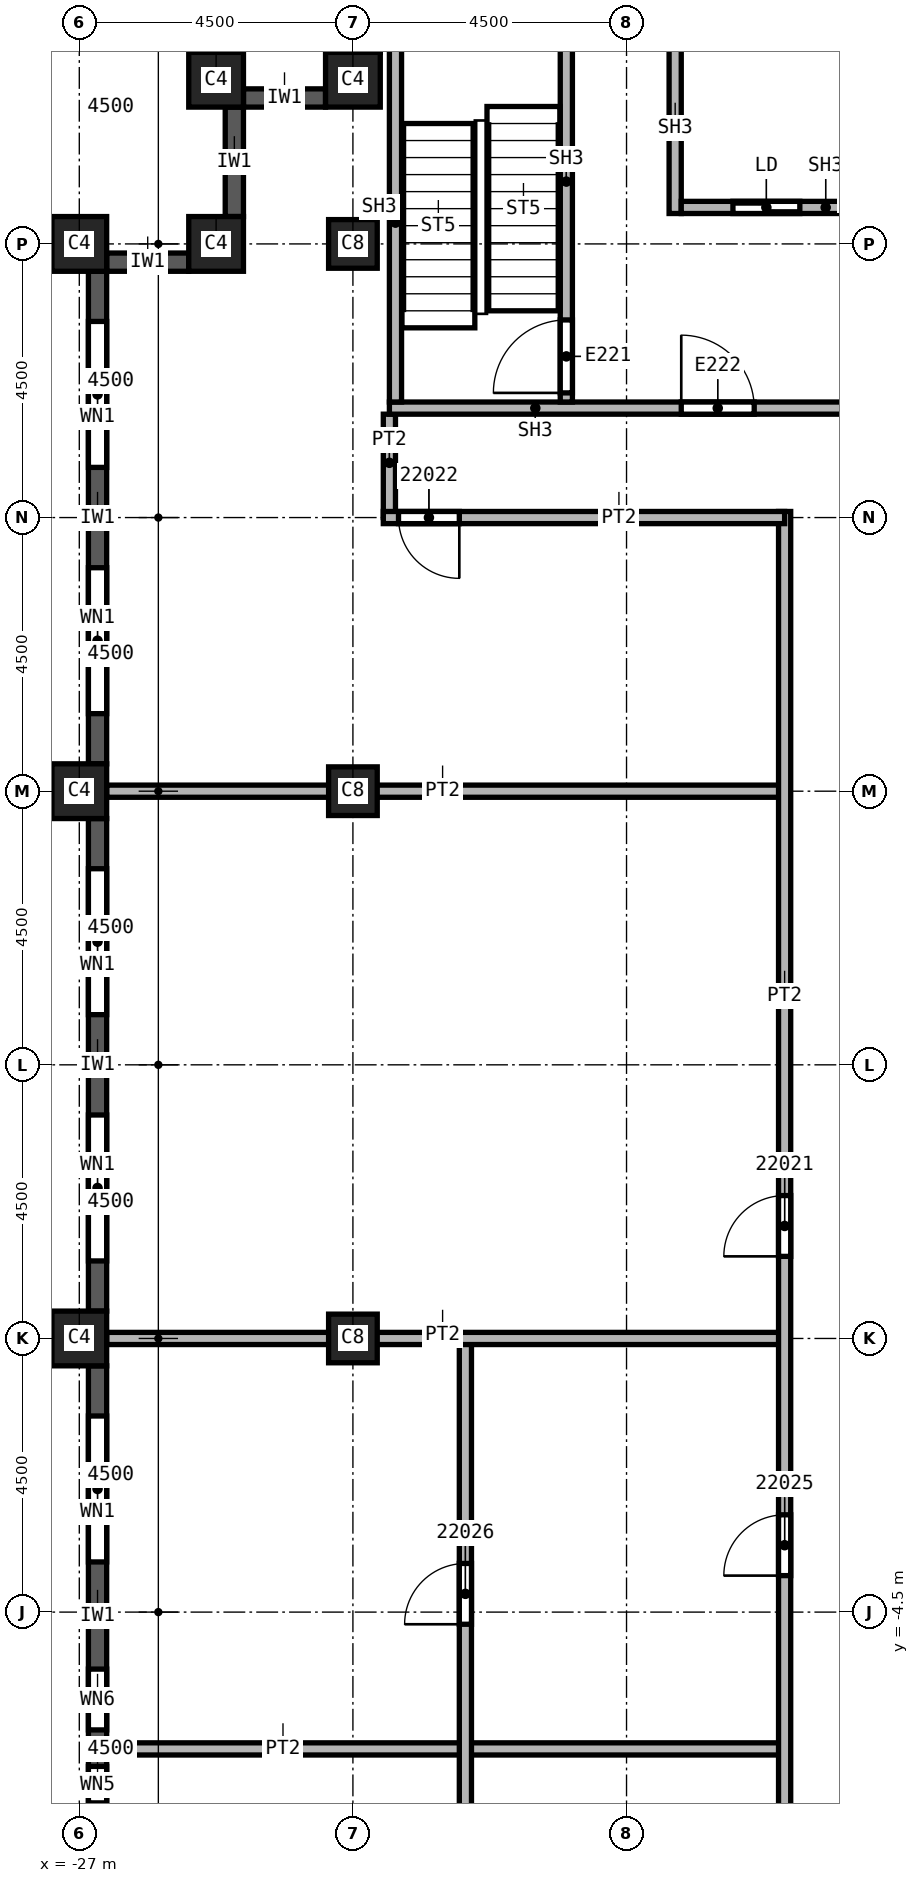
"""IFC4 building model, lengths in metres.
Left out: names, types, materials, properties, quantities, classifications, styles, units other than length and angle.
Written with IfcOpenShell. Run it as: python <this file> out.ifc"""

import sys

from ifc_helpers import new_model, si_unit, direction, frame, frame_2d, origin, origin_2d, place, context, subcontext, project, spatial, rectangle, extrude, element, fill, save


model = new_model("IFC4")
c1 = context("Model", 3, precision=1e-05, world=origin(), true_north=direction((0.0, 1.0)))
c2 = subcontext(c1, "Body", "Model", "MODEL_VIEW")
j1 = project(units=[si_unit("LENGTHUNIT", "METRE"), si_unit("PLANEANGLEUNIT", "RADIAN")], contexts=[c1])
p1 = place(None, origin())
s1 = spatial("IfcSite", under=j1, at=p1, CompositionType="ELEMENT")
p2 = place(p1, origin())
s2 = spatial("IfcBuilding", under=s1, at=p2, CompositionType="ELEMENT")
p3 = place(p2, frame((0.0, 0.0, 312.0)))
s3 = spatial("IfcBuildingStorey", under=s2, at=p3, CompositionType="ELEMENT", Elevation=312.0)
for number, where, z_axis, x_axis in (
    (1, (-22.5, 0.0, 0.0), (0.0, 0.0, 1.0), (1.0, 0.0, 0.0)),
    (2, (-22.5, 9.0, 0.0), (0.0, 0.0, 1.0), (1.0, 0.0, 0.0)),
    (3, (-22.5, 18.0, 0.0), (0.0, 0.0, 1.0), (1.0, 0.0, 0.0)),
):
    element("IfcColumn", number, at=place(p3, frame(where, z_axis=z_axis, x_axis=x_axis)), inside=s3, PredefinedType="COLUMN", context=c2, shape_type="SweptSolid", body=[
        extrude(rectangle(XDim=0.8, YDim=0.8, at=origin_2d()), origin(), (0.0, 0.0, 1.0), 3.74),
    ])
for number, where, z_axis, x_axis in (
    (4, (-27.0, 0.0, 0.0), (0.0, 0.0, 1.0), (0.0, 1.0, 0.0)),
    (5, (-27.0, 9.0, 0.0), (0.0, 0.0, 1.0), (0.0, 1.0, 0.0)),
    (6, (-27.0, 18.0, 0.0), (0.0, 0.0, 1.0), (0.0, 1.0, 0.0)),
    (7, (-22.5, 20.7, 0.0), (0.0, 0.0, 1.0), (1.0, 0.0, 0.0)),
    (8, (-24.75, 20.7, 0.0), (0.0, 0.0, 1.0), (1.0, 0.0, 0.0)),
    (9, (-24.75, 18.0, 0.0), (0.0, 0.0, 1.0), (1.0, 0.0, 0.0)),
):
    element("IfcColumn", number, at=place(p3, frame(where, z_axis=z_axis, x_axis=x_axis)), inside=s3, PredefinedType="COLUMN", context=c2, shape_type="SweptSolid", body=[
        extrude(rectangle(XDim=0.9, YDim=0.9, at=origin_2d()), origin(), (0.0, 0.0, 1.0), 3.74),
    ])
p4 = place(p3, frame((-24.45, 20.25, 0.0), z_axis=(0.0, 0.0, 1.0), x_axis=(0.0, -1.0, 0.0)))
e10 = element("IfcWall", 10, at=p4, inside=s3, PredefinedType="SOLIDWALL", context=c2, shape_type="SweptSolid", body=[
    extrude(rectangle(XDim=1.8, YDim=0.3, at=frame_2d((0.9, 0.0))), origin(), (0.0, 0.0, 1.0), 3.14),
])
p5 = place(p3, frame((-25.2, 17.7, 0.0), z_axis=(0.0, 0.0, 1.0), x_axis=(-1.0, 0.0, 0.0)))
e11 = element("IfcWall", 11, at=p5, inside=s3, PredefinedType="SOLIDWALL", context=c2, shape_type="SweptSolid", body=[
    extrude(rectangle(XDim=1.35, YDim=0.3, at=frame_2d((0.675, 0.0))), origin(), (0.0, 0.0, 1.0), 3.14),
])
p6 = place(p3, frame((-26.7, 17.55, 0.0), z_axis=(0.0, 0.0, 1.0), x_axis=(0.0, -1.0, 0.0)))
e12 = element("IfcWall", 12, at=p6, inside=s3, PredefinedType="SOLIDWALL", context=c2, shape_type="SweptSolid", body=[
    extrude(rectangle(XDim=8.1, YDim=0.3, at=frame_2d((4.05, 0.0))), origin(), (0.0, 0.0, 1.0), 3.14),
])
p7 = place(p6, frame((0.825, 0.0, 0.8)))
e13 = element("IfcOpeningElement", 13, at=p7, cuts=e12, PredefinedType="OPENING", context=c2, shape_type="SweptSolid", body=[
    extrude(rectangle(XDim=2.4, YDim=1.95, at=frame_2d((1.2, 0.975))), frame((0.0, 0.15, 0.0), z_axis=(0.0, -1.0, 0.0), x_axis=(1.0, 0.0, 0.0)), (0.0, 0.0, 1.0), 0.3),
])
p8 = place(p6, frame((4.875, 0.0, 0.8)))
e14 = element("IfcOpeningElement", 14, at=p8, cuts=e12, PredefinedType="OPENING", context=c2, shape_type="SweptSolid", body=[
    extrude(rectangle(XDim=2.4, YDim=1.95, at=frame_2d((1.2, 0.975))), frame((0.0, 0.15, 0.0), z_axis=(0.0, -1.0, 0.0), x_axis=(1.0, 0.0, 0.0)), (0.0, 0.0, 1.0), 0.3),
])
p9 = place(p3, frame((-26.7, 8.55, 0.0), z_axis=(0.0, 0.0, 1.0), x_axis=(0.0, -1.0, 0.0)))
e15 = element("IfcWall", 15, at=p9, inside=s3, PredefinedType="SOLIDWALL", context=c2, shape_type="SweptSolid", body=[
    extrude(rectangle(XDim=8.1, YDim=0.3, at=frame_2d((4.05, 0.0))), origin(), (0.0, 0.0, 1.0), 3.14),
])
p10 = place(p9, frame((0.825, 0.0, 0.8)))
e16 = element("IfcOpeningElement", 16, at=p10, cuts=e15, PredefinedType="OPENING", context=c2, shape_type="SweptSolid", body=[
    extrude(rectangle(XDim=2.4, YDim=1.95, at=frame_2d((1.2, 0.975))), frame((0.0, 0.15, 0.0), z_axis=(0.0, -1.0, 0.0), x_axis=(1.0, 0.0, 0.0)), (0.0, 0.0, 1.0), 0.3),
])
p11 = place(p9, frame((4.875, 0.0, 0.8)))
e17 = element("IfcOpeningElement", 17, at=p11, cuts=e15, PredefinedType="OPENING", context=c2, shape_type="SweptSolid", body=[
    extrude(rectangle(XDim=2.4, YDim=1.95, at=frame_2d((1.2, 0.975))), frame((0.0, 0.15, 0.0), z_axis=(0.0, -1.0, 0.0), x_axis=(1.0, 0.0, 0.0)), (0.0, 0.0, 1.0), 0.3),
])
p12 = place(p3, frame((-26.7, -0.45, 0.0), z_axis=(0.0, 0.0, 1.0), x_axis=(0.0, -1.0, 0.0)))
e18 = element("IfcWall", 18, at=p12, inside=s3, PredefinedType="SOLIDWALL", context=c2, shape_type="SweptSolid", body=[
    extrude(rectangle(XDim=8.1, YDim=0.3, at=frame_2d((4.05, 0.0))), origin(), (0.0, 0.0, 1.0), 3.14),
])
p13 = place(p12, frame((0.825, 0.0, 0.8)))
e19 = element("IfcOpeningElement", 19, at=p13, cuts=e18, PredefinedType="OPENING", context=c2, shape_type="SweptSolid", body=[
    extrude(rectangle(XDim=2.4, YDim=1.95, at=frame_2d((1.2, 0.975))), frame((0.0, 0.15, 0.0), z_axis=(0.0, -1.0, 0.0), x_axis=(1.0, 0.0, 0.0)), (0.0, 0.0, 1.0), 0.3),
])
p14 = place(p12, frame((4.988, 0.0, 0.8)))
e20 = element("IfcOpeningElement", 20, at=p14, cuts=e18, PredefinedType="OPENING", context=c2, shape_type="SweptSolid", body=[
    extrude(rectangle(XDim=1.0, YDim=1.95, at=frame_2d((0.5, 0.975))), frame((0.0, 0.15, 0.0), z_axis=(0.0, -1.0, 0.0), x_axis=(1.0, 0.0, 0.0)), (0.0, 0.0, 1.0), 0.3),
])
p15 = place(p12, frame((6.587, 0.0, 0.8)))
e21 = element("IfcOpeningElement", 21, at=p15, cuts=e18, PredefinedType="OPENING", context=c2, shape_type="SweptSolid", body=[
    extrude(rectangle(XDim=0.6, YDim=1.95, at=frame_2d((0.3, 0.975))), frame((0.0, 0.15, 0.0), z_axis=(0.0, -1.0, 0.0), x_axis=(1.0, 0.0, 0.0)), (0.0, 0.0, 1.0), 0.3),
])
p16 = place(p3, frame((-22.95, 20.4, 0.0), z_axis=(0.0, 0.0, 1.0), x_axis=(-1.0, 0.0, 0.0)))
e22 = element("IfcWall", 22, at=p16, inside=s3, PredefinedType="SOLIDWALL", context=c2, shape_type="SweptSolid", body=[
    extrude(rectangle(XDim=1.35, YDim=0.3, at=frame_2d((0.675, 0.0))), origin(), (0.0, 0.0, 1.0), 3.14),
])
for number, where, z_axis, x_axis in (
    (23, (-26.55, -6.75, 0.0), (0.0, 0.0, 1.0), (1.0, 0.0, 0.0)),
    (24, (-26.55, 9.0, 0.0), (0.0, 0.0, 1.0), (1.0, 0.0, 0.0)),
):
    element("IfcWall", number, at=place(p3, frame(where, z_axis=z_axis, x_axis=x_axis)), inside=s3, PredefinedType="PARTITIONING", context=c2, shape_type="SweptSolid", body=[
        extrude(rectangle(XDim=11.15, YDim=0.2, at=frame_2d((5.575, 0.0))), origin(), (0.0, 0.0, 1.0), 3.74),
    ])
p17 = place(p3, frame((-21.9, 13.5, 0.0), z_axis=(0.0, 0.0, 1.0), x_axis=(0.0, 1.0, 0.0)))
e25 = element("IfcWall", 25, at=p17, inside=s3, PredefinedType="PARTITIONING", context=c2, shape_type="SweptSolid", body=[
    extrude(rectangle(XDim=1.7, YDim=0.2, at=frame_2d((0.85, 0.0))), origin(), (0.0, 0.0, 1.0), 3.74),
])
p18 = place(p3, frame((-20.65, -22.95, 0.0), z_axis=(0.0, 0.0, 1.0), x_axis=(0.0, 1.0, 0.0)))
e26 = element("IfcWall", 26, at=p18, inside=s3, PredefinedType="PARTITIONING", context=c2, shape_type="SweptSolid", body=[
    extrude(rectangle(XDim=22.95, YDim=0.2, at=frame_2d((11.475, 0.0))), origin(), (0.0, 0.0, 1.0), 3.74),
])
p19 = place(p18, frame((8.5, 0.0, 0.0)))
e27 = element("IfcOpeningElement", 27, at=p19, cuts=e26, PredefinedType="OPENING", context=c2, shape_type="SweptSolid", body=[
    extrude(rectangle(XDim=1.0, YDim=2.1, at=frame_2d((0.5, 1.05))), frame((0.0, 0.1, 0.0), z_axis=(0.0, -1.0, 0.0), x_axis=(1.0, 0.0, 0.0)), (0.0, 0.0, 1.0), 0.2),
])
p20 = place(p18, frame((18.25, 0.0, 0.0)))
e28 = element("IfcOpeningElement", 28, at=p20, cuts=e26, PredefinedType="OPENING", context=c2, shape_type="SweptSolid", body=[
    extrude(rectangle(XDim=1.0, YDim=2.1, at=frame_2d((0.5, 1.05))), frame((0.0, 0.1, 0.0), z_axis=(0.0, -1.0, 0.0), x_axis=(1.0, 0.0, 0.0)), (0.0, 0.0, 1.0), 0.2),
])
p21 = place(p3, frame((-15.4, 0.0, 0.0), z_axis=(0.0, 0.0, 1.0), x_axis=(-1.0, 0.0, 0.0)))
e29 = element("IfcWall", 29, at=p21, inside=s3, PredefinedType="PARTITIONING", context=c2, shape_type="SweptSolid", body=[
    extrude(rectangle(XDim=11.15, YDim=0.2, at=frame_2d((5.575, 0.0))), origin(), (0.0, 0.0, 1.0), 3.74),
])
p22 = place(p3, frame((-15.4, -22.95, 0.0), z_axis=(0.0, 0.0, 1.0), x_axis=(0.0, 1.0, 0.0)))
e30 = element("IfcWall", 30, at=p22, inside=s3, PredefinedType="PARTITIONING", context=c2, shape_type="SweptSolid", body=[
    extrude(rectangle(XDim=36.55, YDim=0.2, at=frame_2d((18.275, 0.0))), origin(), (0.0, 0.0, 1.0), 3.74),
])
p23 = place(p22, frame((24.3, 0.0, 0.0)))
e31 = element("IfcOpeningElement", 31, at=p23, cuts=e30, PredefinedType="OPENING", context=c2, shape_type="SweptSolid", body=[
    extrude(rectangle(XDim=1.0, YDim=2.1, at=frame_2d((0.5, 1.05))), frame((0.0, 0.1, 0.0), z_axis=(0.0, -1.0, 0.0), x_axis=(1.0, 0.0, 0.0)), (0.0, 0.0, 1.0), 0.2),
])
p24 = place(p22, frame((9.4, 0.0, 0.0)))
e32 = element("IfcOpeningElement", 32, at=p24, cuts=e30, PredefinedType="OPENING", context=c2, shape_type="SweptSolid", body=[
    extrude(rectangle(XDim=1.0, YDim=2.1, at=frame_2d((0.5, 1.05))), frame((0.0, 0.1, 0.0), z_axis=(0.0, -1.0, 0.0), x_axis=(1.0, 0.0, 0.0)), (0.0, 0.0, 1.0), 0.2),
])
p25 = place(p22, frame((19.05, 0.0, 0.0)))
e33 = element("IfcOpeningElement", 33, at=p25, cuts=e30, PredefinedType="OPENING", context=c2, shape_type="SweptSolid", body=[
    extrude(rectangle(XDim=1.0, YDim=2.1, at=frame_2d((0.5, 1.05))), frame((0.0, 0.1, 0.0), z_axis=(0.0, -1.0, 0.0), x_axis=(1.0, 0.0, 0.0)), (0.0, 0.0, 1.0), 0.2),
])
p26 = place(p3, frame((-15.4, 13.5, 0.0), z_axis=(0.0, 0.0, 1.0), x_axis=(-1.0, 0.0, 0.0)))
e34 = element("IfcWall", 34, at=p26, inside=s3, PredefinedType="PARTITIONING", context=c2, shape_type="SweptSolid", body=[
    extrude(rectangle(XDim=6.6, YDim=0.2, at=frame_2d((3.3, 0.0))), origin(), (0.0, 0.0, 1.0), 3.74),
])
p27 = place(p26, frame((5.35, 0.0, 0.0)))
e35 = element("IfcOpeningElement", 35, at=p27, cuts=e34, PredefinedType="OPENING", context=c2, shape_type="SweptSolid", body=[
    extrude(rectangle(XDim=1.0, YDim=2.1, at=frame_2d((0.5, 1.05))), frame((0.0, 0.1, 0.0), z_axis=(0.0, -1.0, 0.0), x_axis=(1.0, 0.0, 0.0)), (0.0, 0.0, 1.0), 0.2),
])
p28 = place(p3, frame((-21.9, 15.3, 0.0), z_axis=(0.0, 0.0, 1.0), x_axis=(1.0, 0.0, 0.0)))
e36 = element("IfcWall", 36, at=p28, inside=s3, PredefinedType="SOLIDWALL", context=c2, shape_type="SweptSolid", body=[
    extrude(rectangle(XDim=8.275, YDim=0.2, at=frame_2d((4.137, 0.0))), origin(), (0.0, 0.0, 1.0), 3.74),
])
p29 = place(p28, frame((4.8, 0.0, 0.0)))
e37 = element("IfcOpeningElement", 37, at=p29, cuts=e36, PredefinedType="OPENING", context=c2, shape_type="SweptSolid", body=[
    extrude(rectangle(XDim=1.2, YDim=2.1, at=frame_2d((0.6, 1.05))), frame((0.0, 0.1, 0.0), z_axis=(0.0, -1.0, 0.0), x_axis=(1.0, 0.0, 0.0)), (0.0, 0.0, 1.0), 0.2),
])
p30 = place(p3, frame((-21.8, 15.4, 0.0), z_axis=(0.0, 0.0, 1.0), x_axis=(0.0, 1.0, 0.0)))
e38 = element("IfcWall", 38, at=p30, inside=s3, PredefinedType="SOLIDWALL", context=c2, shape_type="SweptSolid", body=[
    extrude(rectangle(XDim=5.9, YDim=0.2, at=frame_2d((2.95, 0.0))), origin(), (0.0, 0.0, 1.0), 3.74),
])
p31 = place(p3, frame((-18.99, 15.4, 0.0), z_axis=(0.0, 0.0, 1.0), x_axis=(0.0, 1.0, 0.0)))
e39 = element("IfcWall", 39, at=p31, inside=s3, PredefinedType="SOLIDWALL", context=c2, shape_type="SweptSolid", body=[
    extrude(rectangle(XDim=5.9, YDim=0.2, at=frame_2d((2.95, 0.0))), origin(), (0.0, 0.0, 1.0), 3.74),
])
p32 = place(p31, frame((0.15, 0.0, 0.0)))
e40 = element("IfcOpeningElement", 40, at=p32, cuts=e39, PredefinedType="OPENING", context=c2, shape_type="SweptSolid", body=[
    extrude(rectangle(XDim=1.2, YDim=2.1, at=frame_2d((0.6, 1.05))), frame((0.0, 0.1, 0.0), z_axis=(0.0, -1.0, 0.0), x_axis=(1.0, 0.0, 0.0)), (0.0, 0.0, 1.0), 0.2),
])
p33 = place(p3, frame((-17.2, 18.5, 0.0), z_axis=(0.0, 0.0, 1.0), x_axis=(0.0, 1.0, 0.0)))
e41 = element("IfcWall", 41, at=p33, inside=s3, PredefinedType="SOLIDWALL", context=c2, shape_type="SweptSolid", body=[
    extrude(rectangle(XDim=2.8, YDim=0.2, at=frame_2d((1.4, 0.0))), origin(), (0.0, 0.0, 1.0), 3.74),
])
p34 = place(p3, frame((-17.1, 18.6, 0.0), z_axis=(0.0, 0.0, 1.0), x_axis=(1.0, 0.0, 0.0)))
e42 = element("IfcWall", 42, at=p34, inside=s3, PredefinedType="SOLIDWALL", context=c2, shape_type="SweptSolid", body=[
    extrude(rectangle(XDim=2.8, YDim=0.2, at=frame_2d((1.4, 0.0))), origin(), (0.0, 0.0, 1.0), 3.74),
])
p35 = place(p34, frame((0.85, 0.0, 0.0)))
e43 = element("IfcOpeningElement", 43, at=p35, cuts=e42, PredefinedType="OPENING", context=c2, shape_type="SweptSolid", body=[
    extrude(rectangle(XDim=1.1, YDim=2.1, at=frame_2d((0.55, 1.05))), frame((0.0, 0.1, 0.0), z_axis=(0.0, -1.0, 0.0), x_axis=(1.0, 0.0, 0.0)), (0.0, 0.0, 1.0), 0.2),
])
p36 = place(p7, origin())
e44 = element("IfcWindow", 44, at=p36, inside=s3, PartitioningType="SINGLE_PANEL", PredefinedType="WINDOW", context=c2, shape_type="SweptSolid", body=[
    extrude(rectangle(XDim=2.4, YDim=1.95, at=frame_2d((1.2, 0.975))), frame((0.0, 0.03, 0.0), z_axis=(0.0, -1.0, 0.0), x_axis=(1.0, 0.0, 0.0)), (0.0, 0.0, 1.0), 0.06),
])
fill(e13, e44)
p37 = place(p8, origin())
e45 = element("IfcWindow", 45, at=p37, inside=s3, PartitioningType="SINGLE_PANEL", PredefinedType="WINDOW", context=c2, shape_type="SweptSolid", body=[
    extrude(rectangle(XDim=2.4, YDim=1.95, at=frame_2d((1.2, 0.975))), frame((0.0, 0.03, 0.0), z_axis=(0.0, -1.0, 0.0), x_axis=(1.0, 0.0, 0.0)), (0.0, 0.0, 1.0), 0.06),
])
fill(e14, e45)
p38 = place(p10, origin())
e46 = element("IfcWindow", 46, at=p38, inside=s3, PartitioningType="SINGLE_PANEL", PredefinedType="WINDOW", context=c2, shape_type="SweptSolid", body=[
    extrude(rectangle(XDim=2.4, YDim=1.95, at=frame_2d((1.2, 0.975))), frame((0.0, 0.03, 0.0), z_axis=(0.0, -1.0, 0.0), x_axis=(1.0, 0.0, 0.0)), (0.0, 0.0, 1.0), 0.06),
])
fill(e16, e46)
p39 = place(p11, origin())
e47 = element("IfcWindow", 47, at=p39, inside=s3, PartitioningType="SINGLE_PANEL", PredefinedType="WINDOW", context=c2, shape_type="SweptSolid", body=[
    extrude(rectangle(XDim=2.4, YDim=1.95, at=frame_2d((1.2, 0.975))), frame((0.0, 0.03, 0.0), z_axis=(0.0, -1.0, 0.0), x_axis=(1.0, 0.0, 0.0)), (0.0, 0.0, 1.0), 0.06),
])
fill(e17, e47)
p40 = place(p13, origin())
e48 = element("IfcWindow", 48, at=p40, inside=s3, PartitioningType="SINGLE_PANEL", PredefinedType="WINDOW", context=c2, shape_type="SweptSolid", body=[
    extrude(rectangle(XDim=2.4, YDim=1.95, at=frame_2d((1.2, 0.975))), frame((0.0, 0.03, 0.0), z_axis=(0.0, -1.0, 0.0), x_axis=(1.0, 0.0, 0.0)), (0.0, 0.0, 1.0), 0.06),
])
fill(e19, e48)
p41 = place(p23, origin())
e49 = element("IfcDoor", 49, at=p41, inside=s3, OperationType="SINGLE_SWING_RIGHT", PredefinedType="DOOR", context=c2, shape_type="SweptSolid", body=[
    extrude(rectangle(XDim=1.0, YDim=2.1, at=frame_2d((0.5, 1.05))), frame((0.0, 0.025, 0.0), z_axis=(0.0, -1.0, 0.0), x_axis=(1.0, 0.0, 0.0)), (0.0, 0.0, 1.0), 0.05),
])
fill(e31, e49)
p42 = place(p27, origin())
e50 = element("IfcDoor", 50, at=p42, inside=s3, OperationType="SINGLE_SWING_LEFT", PredefinedType="DOOR", context=c2, shape_type="SweptSolid", body=[
    extrude(rectangle(XDim=1.0, YDim=2.1, at=frame_2d((0.5, 1.05))), frame((0.0, 0.025, 0.0), z_axis=(0.0, -1.0, 0.0), x_axis=(1.0, 0.0, 0.0)), (0.0, 0.0, 1.0), 0.05),
])
fill(e35, e50)
p43 = place(p25, origin())
e51 = element("IfcDoor", 51, at=p43, inside=s3, OperationType="SINGLE_SWING_RIGHT", PredefinedType="DOOR", context=c2, shape_type="SweptSolid", body=[
    extrude(rectangle(XDim=1.0, YDim=2.1, at=frame_2d((0.5, 1.05))), frame((0.0, 0.025, 0.0), z_axis=(0.0, -1.0, 0.0), x_axis=(1.0, 0.0, 0.0)), (0.0, 0.0, 1.0), 0.05),
])
fill(e33, e51)
p44 = place(p20, origin())
e52 = element("IfcDoor", 52, at=p44, inside=s3, OperationType="SINGLE_SWING_LEFT", PredefinedType="DOOR", context=c2, shape_type="SweptSolid", body=[
    extrude(rectangle(XDim=1.0, YDim=2.1, at=frame_2d((0.5, 1.05))), frame((0.0, 0.025, 0.0), z_axis=(0.0, -1.0, 0.0), x_axis=(1.0, 0.0, 0.0)), (0.0, 0.0, 1.0), 0.05),
])
fill(e28, e52)
p45 = place(p32, origin())
e53 = element("IfcDoor", 53, at=p45, inside=s3, OperationType="SINGLE_SWING_LEFT", PredefinedType="DOOR", context=c2, shape_type="SweptSolid", body=[
    extrude(rectangle(XDim=1.2, YDim=2.1, at=frame_2d((0.6, 1.05))), frame((0.0, 0.025, 0.0), z_axis=(0.0, -1.0, 0.0), x_axis=(1.0, 0.0, 0.0)), (0.0, 0.0, 1.0), 0.05),
])
fill(e40, e53)
p46 = place(p35, origin())
e54 = element("IfcDoor", 54, at=p46, inside=s3, OperationType="SLIDING_TO_LEFT", PredefinedType="DOOR", context=c2, shape_type="SweptSolid", body=[
    extrude(rectangle(XDim=1.1, YDim=2.1, at=frame_2d((0.55, 1.05))), frame((0.0, 0.025, 0.0), z_axis=(0.0, -1.0, 0.0), x_axis=(1.0, 0.0, 0.0)), (0.0, 0.0, 1.0), 0.05),
])
fill(e43, e54)
p47 = place(p29, origin())
e55 = element("IfcDoor", 55, at=p47, inside=s3, OperationType="SINGLE_SWING_RIGHT", PredefinedType="DOOR", context=c2, shape_type="SweptSolid", body=[
    extrude(rectangle(XDim=1.2, YDim=2.1, at=frame_2d((0.6, 1.05))), frame((0.0, 0.025, 0.0), z_axis=(0.0, -1.0, 0.0), x_axis=(1.0, 0.0, 0.0)), (0.0, 0.0, 1.0), 0.05),
])
fill(e37, e55)
p48 = place(p14, origin())
e56 = element("IfcWindow", 56, at=p48, inside=s3, PartitioningType="SINGLE_PANEL", PredefinedType="WINDOW", context=c2, shape_type="SweptSolid", body=[
    extrude(rectangle(XDim=1.0, YDim=1.95, at=frame_2d((0.5, 0.975))), frame((0.0, 0.03, 0.0), z_axis=(0.0, -1.0, 0.0), x_axis=(1.0, 0.0, 0.0)), (0.0, 0.0, 1.0), 0.06),
])
fill(e20, e56)
p49 = place(p15, origin())
e57 = element("IfcWindow", 57, at=p49, inside=s3, PartitioningType="SINGLE_PANEL", PredefinedType="WINDOW", context=c2, shape_type="SweptSolid", body=[
    extrude(rectangle(XDim=0.6, YDim=1.95, at=frame_2d((0.3, 0.975))), frame((0.0, 0.03, 0.0), z_axis=(0.0, -1.0, 0.0), x_axis=(1.0, 0.0, 0.0)), (0.0, 0.0, 1.0), 0.06),
])
fill(e21, e57)
save(model, sys.argv[1])
